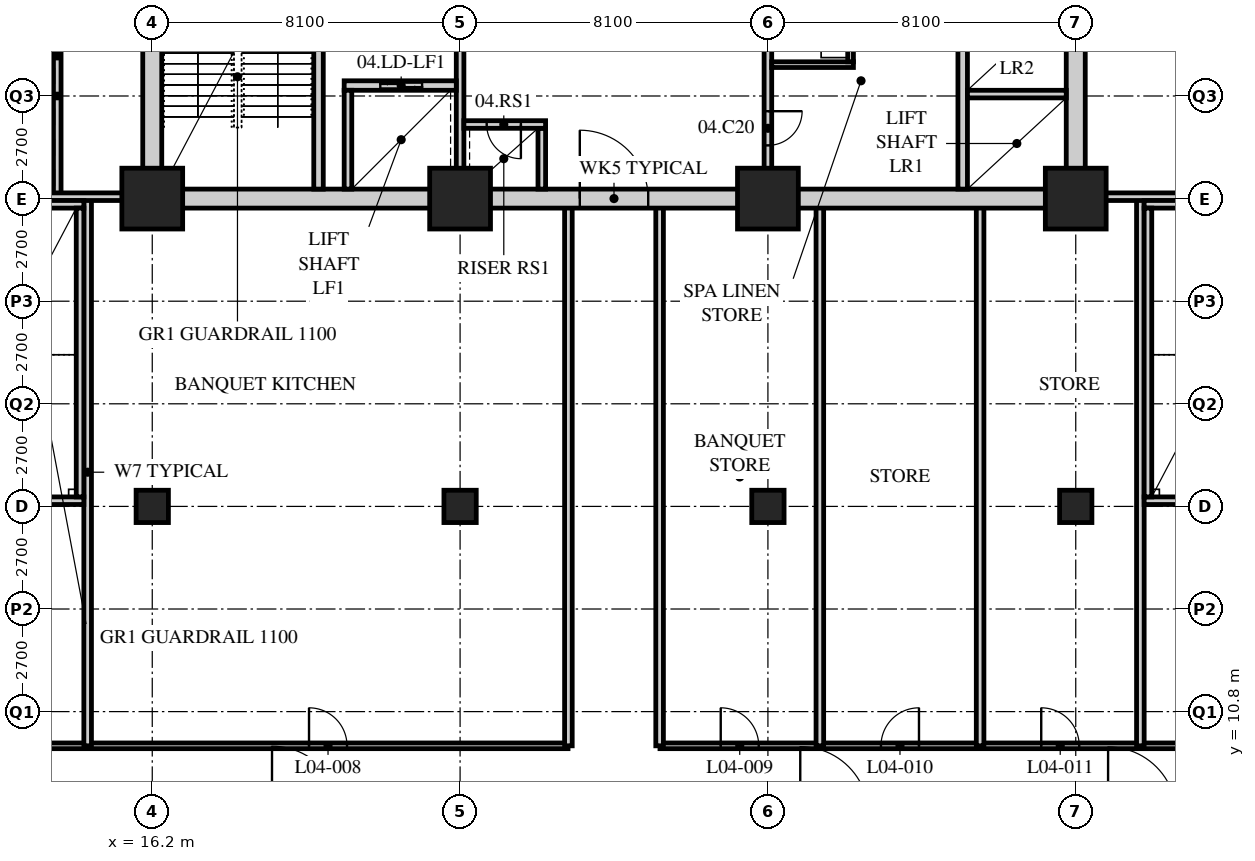
"""IFC4 building model, lengths in metres.
Left out: names, types, materials, properties, quantities, classifications, styles, units other than length and angle.
Written with IfcOpenShell. Run it as: python <this file> out.ifc"""

import sys

from ifc_helpers import new_model, si_unit, direction, frame, frame_2d, origin, origin_2d, place, context, subcontext, project, spatial, rectangle, hollow_rectangle, extrude, element, fill, save


model = new_model("IFC4")
c1 = context("Model", 3, precision=1e-05, world=origin(), true_north=direction((0.0, 1.0)))
c2 = subcontext(c1, "Body", "Model", "MODEL_VIEW")
j1 = project(units=[si_unit("LENGTHUNIT", "METRE"), si_unit("PLANEANGLEUNIT", "RADIAN")], contexts=[c1])
p1 = place(None, origin())
s1 = spatial("IfcSite", under=j1, at=p1, CompositionType="ELEMENT")
p2 = place(p1, origin())
s2 = spatial("IfcBuilding", under=s1, at=p2, CompositionType="ELEMENT")
p3 = place(p2, frame((0.0, 0.0, 22.2)))
s3 = spatial("IfcBuildingStorey", under=s2, at=p3, CompositionType="ELEMENT", Elevation=22.2)
p4 = place(p3, frame((16.2, 16.2, 0.0), z_axis=(0.0, 0.0, 1.0), x_axis=(1.0, 0.0, 0.0)))
e1 = element("IfcColumn", 1, at=p4, inside=s3, PredefinedType="COLUMN", context=c2, shape_type="SweptSolid", body=[
    extrude(hollow_rectangle(XDim=0.85, YDim=0.85, WallThickness=0.085, at=origin_2d()), origin(), (0.0, 0.0, 1.0), 5.4),
])
p5 = place(p3, frame((16.2, 24.3, 0.0), z_axis=(0.0, 0.0, 1.0), x_axis=(1.0, 0.0, 0.0)))
e2 = element("IfcColumn", 2, at=p5, inside=s3, PredefinedType="COLUMN", context=c2, shape_type="SweptSolid", body=[
    extrude(hollow_rectangle(XDim=1.6, YDim=1.6, WallThickness=0.15, at=origin_2d()), origin(), (0.0, 0.0, 1.0), 5.4),
])
p6 = place(p3, frame((24.3, 16.2, 0.0), z_axis=(0.0, 0.0, 1.0), x_axis=(1.0, 0.0, 0.0)))
e3 = element("IfcColumn", 3, at=p6, inside=s3, PredefinedType="COLUMN", context=c2, shape_type="SweptSolid", body=[
    extrude(hollow_rectangle(XDim=0.85, YDim=0.85, WallThickness=0.085, at=origin_2d()), origin(), (0.0, 0.0, 1.0), 5.4),
])
p7 = place(p3, frame((24.3, 24.3, 0.0), z_axis=(0.0, 0.0, 1.0), x_axis=(1.0, 0.0, 0.0)))
e4 = element("IfcColumn", 4, at=p7, inside=s3, PredefinedType="COLUMN", context=c2, shape_type="SweptSolid", body=[
    extrude(hollow_rectangle(XDim=1.6, YDim=1.6, WallThickness=0.15, at=origin_2d()), origin(), (0.0, 0.0, 1.0), 5.4),
])
p8 = place(p3, frame((32.4, 16.2, 0.0), z_axis=(0.0, 0.0, 1.0), x_axis=(1.0, 0.0, 0.0)))
e5 = element("IfcColumn", 5, at=p8, inside=s3, PredefinedType="COLUMN", context=c2, shape_type="SweptSolid", body=[
    extrude(hollow_rectangle(XDim=0.85, YDim=0.85, WallThickness=0.085, at=origin_2d()), origin(), (0.0, 0.0, 1.0), 5.4),
])
p9 = place(p3, frame((32.4, 24.3, 0.0), z_axis=(0.0, 0.0, 1.0), x_axis=(1.0, 0.0, 0.0)))
e6 = element("IfcColumn", 6, at=p9, inside=s3, PredefinedType="COLUMN", context=c2, shape_type="SweptSolid", body=[
    extrude(hollow_rectangle(XDim=1.6, YDim=1.6, WallThickness=0.15, at=origin_2d()), origin(), (0.0, 0.0, 1.0), 5.4),
])
p10 = place(p3, frame((40.5, 16.2, 0.0), z_axis=(0.0, 0.0, 1.0), x_axis=(1.0, 0.0, 0.0)))
e7 = element("IfcColumn", 7, at=p10, inside=s3, PredefinedType="COLUMN", context=c2, shape_type="SweptSolid", body=[
    extrude(hollow_rectangle(XDim=0.85, YDim=0.85, WallThickness=0.085, at=origin_2d()), origin(), (0.0, 0.0, 1.0), 5.4),
])
p11 = place(p3, frame((40.5, 24.3, 0.0), z_axis=(0.0, 0.0, 1.0), x_axis=(1.0, 0.0, 0.0)))
e8 = element("IfcColumn", 8, at=p11, inside=s3, PredefinedType="COLUMN", context=c2, shape_type="SweptSolid", body=[
    extrude(hollow_rectangle(XDim=1.6, YDim=1.6, WallThickness=0.15, at=origin_2d()), origin(), (0.0, 0.0, 1.0), 5.4),
])
p12 = place(p3, frame((9.9, 9.9, 0.0), z_axis=(0.0, 0.0, 1.0), x_axis=(1.0, 0.0, 0.0)))
e9 = element("IfcWall", 9, at=p12, inside=s3, PredefinedType="PARTITIONING", context=c2, shape_type="SweptSolid", body=[
    extrude(rectangle(XDim=17.24, YDim=0.15, at=frame_2d((8.62, 0.0))), origin(), (0.0, 0.0, 1.0), 5.19),
])
p13 = place(p12, frame((10.425, 0.0, 0.0)))
e10 = element("IfcOpeningElement", 10, at=p13, cuts=e9, PredefinedType="OPENING", context=c2, shape_type="SweptSolid", body=[
    extrude(rectangle(XDim=1.0, YDim=2.1, at=frame_2d((0.5, 1.05))), frame((0.0, 0.085, 0.0), z_axis=(0.0, -1.0, 0.0), x_axis=(1.0, 0.0, 0.0)), (0.0, 0.0, 1.0), 0.17),
])
p14 = place(p3, frame((29.56, 9.9, 0.0), z_axis=(0.0, 0.0, 1.0), x_axis=(1.0, 0.0, 0.0)))
e11 = element("IfcWall", 11, at=p14, inside=s3, PredefinedType="PARTITIONING", context=c2, shape_type="SweptSolid", body=[
    extrude(rectangle(XDim=17.24, YDim=0.15, at=frame_2d((8.62, 0.0))), origin(), (0.0, 0.0, 1.0), 5.19),
])
p15 = place(p14, frame((1.598, 0.0, 0.0)))
e12 = element("IfcOpeningElement", 12, at=p15, cuts=e11, PredefinedType="OPENING", context=c2, shape_type="SweptSolid", body=[
    extrude(rectangle(XDim=1.0, YDim=2.1, at=frame_2d((0.5, 1.05))), frame((0.0, 0.085, 0.0), z_axis=(0.0, -1.0, 0.0), x_axis=(1.0, 0.0, 0.0)), (0.0, 0.0, 1.0), 0.17),
])
p16 = place(p14, frame((5.815, 0.0, 0.0)))
e13 = element("IfcOpeningElement", 13, at=p16, cuts=e11, PredefinedType="OPENING", context=c2, shape_type="SweptSolid", body=[
    extrude(rectangle(XDim=1.0, YDim=2.1, at=frame_2d((0.5, 1.05))), frame((0.0, 0.085, 0.0), z_axis=(0.0, -1.0, 0.0), x_axis=(1.0, 0.0, 0.0)), (0.0, 0.0, 1.0), 0.17),
])
p17 = place(p14, frame((10.032, 0.0, 0.0)))
e14 = element("IfcOpeningElement", 14, at=p17, cuts=e11, PredefinedType="OPENING", context=c2, shape_type="SweptSolid", body=[
    extrude(rectangle(XDim=1.0, YDim=2.1, at=frame_2d((0.5, 1.05))), frame((0.0, 0.085, 0.0), z_axis=(0.0, -1.0, 0.0), x_axis=(1.0, 0.0, 0.0)), (0.0, 0.0, 1.0), 0.17),
])
p18 = place(p3, frame((13.7, 24.3, 0.0), z_axis=(0.0, 0.0, 1.0), x_axis=(0.0, 1.0, 0.0)))
e15 = element("IfcWall", 15, at=p18, inside=s3, PredefinedType="SOLIDWALL", context=c2, shape_type="SweptSolid", body=[
    extrude(rectangle(XDim=4.8, YDim=0.2, at=frame_2d((2.4, 0.0))), origin(), (0.0, 0.0, 1.0), 5.19),
])
for number, where, z_axis, x_axis in (
    (16, (14.5, 9.9, 0.0), (0.0, 0.0, 1.0), (0.0, 1.0, 0.0)),
    (17, (33.767, 9.9, 0.0), (0.0, 0.0, 1.0), (0.0, 1.0, 0.0)),
    (18, (37.983, 9.9, 0.0), (0.0, 0.0, 1.0), (0.0, 1.0, 0.0)),
    (19, (42.2, 9.9, 0.0), (0.0, 0.0, 1.0), (0.0, 1.0, 0.0)),
    (20, (27.15, 9.9, 0.0), (0.0, 0.0, 1.0), (0.0, 1.0, 0.0)),
    (21, (29.55, 9.9, 0.0), (0.0, 0.0, 1.0), (0.0, 1.0, 0.0)),
):
    element("IfcWall", number, at=place(p3, frame(where, z_axis=z_axis, x_axis=x_axis)), inside=s3, PredefinedType="SOLIDWALL", context=c2, shape_type="SweptSolid", body=[
        extrude(rectangle(XDim=14.4, YDim=0.2, at=frame_2d((7.2, 0.0))), origin(), (0.0, 0.0, 1.0), 5.19),
    ])
for number, where, z_axis, x_axis in (
    (22, (9.9, 24.35, 0.0), (0.0, 0.0, 1.0), (1.0, 0.0, 0.0)),
    (23, (40.5, 24.35, 0.0), (0.0, 0.0, 1.0), (1.0, 0.0, 0.0)),
):
    element("IfcWall", number, at=place(p3, frame(where, z_axis=z_axis, x_axis=x_axis)), inside=s3, PredefinedType="SOLIDWALL", context=c2, shape_type="SweptSolid", body=[
        extrude(rectangle(XDim=6.3, YDim=0.2, at=frame_2d((3.15, 0.0))), origin(), (0.0, 0.0, 1.0), 4.428),
    ])
for number, where, z_axis, x_axis in (
    (24, (12.0, 27.0, 0.0), (0.0, 0.0, 1.0), (1.0, 0.0, 0.0)),
    (25, (12.0, 28.05, 0.0), (0.0, 0.0, 1.0), (1.0, 0.0, 0.0)),
):
    element("IfcWall", number, at=place(p3, frame(where, z_axis=z_axis, x_axis=x_axis)), inside=s3, PredefinedType="PARTITIONING", context=c2, shape_type="SweptSolid", body=[
        extrude(rectangle(XDim=1.7, YDim=0.1, at=frame_2d((0.85, 0.0))), origin(), (0.0, 0.0, 1.0), 5.19),
    ])
p19 = place(p3, frame((15.95, 24.3, 0.0), z_axis=(0.0, 0.0, 1.0), x_axis=(1.0, 0.0, 0.0)))
e26 = element("IfcWall", 26, at=p19, inside=s3, PredefinedType="SOLIDWALL", context=c2, shape_type="SweptSolid", body=[
    extrude(rectangle(XDim=24.8, YDim=0.5, at=frame_2d((12.4, 0.0))), origin(), (0.0, 0.0, 1.0), 4.428),
])
p20 = place(p19, frame((11.5, 0.0, 0.0)))
e27 = element("IfcOpeningElement", 27, at=p20, cuts=e26, PredefinedType="OPENING", context=c2, shape_type="SweptSolid", body=[
    extrude(rectangle(XDim=1.8, YDim=2.4, at=frame_2d((0.9, 1.2))), frame((0.0, 0.26, 0.0), z_axis=(0.0, -1.0, 0.0), x_axis=(1.0, 0.0, 0.0)), (0.0, 0.0, 1.0), 0.52),
])
for number, where, z_axis, x_axis in (
    (28, (16.2, 24.55, 0.0), (0.0, 0.0, 1.0), (0.0, 1.0, 0.0)),
    (29, (40.5, 24.55, 0.0), (0.0, 0.0, 1.0), (0.0, 1.0, 0.0)),
):
    element("IfcWall", number, at=place(p3, frame(where, z_axis=z_axis, x_axis=x_axis)), inside=s3, PredefinedType="SOLIDWALL", context=c2, shape_type="SweptSolid", body=[
        extrude(rectangle(XDim=15.7, YDim=0.5, at=frame_2d((7.85, 0.0))), origin(), (0.0, 0.0, 1.0), 4.428),
    ])
p21 = place(p3, frame((24.3, 24.55, 0.0), z_axis=(0.0, 0.0, 1.0), x_axis=(0.0, 1.0, 0.0)))
e30 = element("IfcWall", 30, at=p21, inside=s3, PredefinedType="SOLIDWALL", context=c2, shape_type="SweptSolid", body=[
    extrude(rectangle(XDim=7.75, YDim=0.2, at=frame_2d((3.875, 0.0))), origin(), (0.0, 0.0, 1.0), 4.428),
])
p22 = place(p21, frame((4.6, 0.0, 0.0)))
e31 = element("IfcOpeningElement", 31, at=p22, cuts=e30, PredefinedType="OPENING", context=c2, shape_type="SweptSolid", body=[
    extrude(rectangle(XDim=1.2, YDim=2.1, at=frame_2d((0.6, 1.05))), frame((0.0, 0.11, 0.0), z_axis=(0.0, -1.0, 0.0), x_axis=(1.0, 0.0, 0.0)), (0.0, 0.0, 1.0), 0.22),
])
p23 = place(p3, frame((20.575, 24.55, 0.0), z_axis=(0.0, 0.0, 1.0), x_axis=(0.0, 1.0, 0.0)))
e32 = element("IfcWall", 32, at=p23, inside=s3, PredefinedType="SOLIDWALL", context=c2, shape_type="SweptSolid", body=[
    extrude(rectangle(XDim=7.75, YDim=0.25, at=frame_2d((3.875, 0.0))), origin(), (0.0, 0.0, 1.0), 5.19),
])
p24 = place(p23, frame((6.2, 0.0, 0.0)))
e33 = element("IfcOpeningElement", 33, at=p24, cuts=e32, PredefinedType="OPENING", context=c2, shape_type="SweptSolid", body=[
    extrude(rectangle(XDim=1.2, YDim=2.1, at=frame_2d((0.6, 1.05))), frame((0.0, 0.135, 0.0), z_axis=(0.0, -1.0, 0.0), x_axis=(1.0, 0.0, 0.0)), (0.0, 0.0, 1.0), 0.27),
])
p25 = place(p3, frame((21.25, 27.275, 0.0), z_axis=(0.0, 0.0, 1.0), x_axis=(1.0, 0.0, 0.0)))
e34 = element("IfcWall", 34, at=p25, inside=s3, PredefinedType="SOLIDWALL", context=c2, shape_type="SweptSolid", body=[
    extrude(rectangle(XDim=2.95, YDim=0.25, at=frame_2d((1.475, 0.0))), origin(), (0.0, 0.0, 1.0), 5.19),
])
p26 = place(p25, frame((0.95, 0.0, 0.0)))
e35 = element("IfcOpeningElement", 35, at=p26, cuts=e34, PredefinedType="OPENING", context=c2, shape_type="SweptSolid", body=[
    extrude(rectangle(XDim=1.1, YDim=2.4, at=frame_2d((0.55, 1.2))), frame((0.0, 0.135, 0.0), z_axis=(0.0, -1.0, 0.0), x_axis=(1.0, 0.0, 0.0)), (0.0, 0.0, 1.0), 0.27),
])
p27 = place(p3, frame((21.35, 24.55, 0.0), z_axis=(0.0, 0.0, 1.0), x_axis=(0.0, 1.0, 0.0)))
e36 = element("IfcWall", 36, at=p27, inside=s3, PredefinedType="SOLIDWALL", context=c2, shape_type="SweptSolid", body=[
    extrude(rectangle(XDim=2.6, YDim=0.2, at=frame_2d((1.3, 0.0))), origin(), (0.0, 0.0, 1.0), 5.19),
])
p28 = place(p3, frame((26.45, 24.55, 0.0), z_axis=(0.0, 0.0, 1.0), x_axis=(0.0, 1.0, 0.0)))
e37 = element("IfcWall", 37, at=p28, inside=s3, PredefinedType="SOLIDWALL", context=c2, shape_type="SweptSolid", body=[
    extrude(rectangle(XDim=1.6, YDim=0.2, at=frame_2d((0.8, 0.0))), origin(), (0.0, 0.0, 1.0), 5.19),
])
p29 = place(p3, frame((24.4, 26.25, 0.0), z_axis=(0.0, 0.0, 1.0), x_axis=(1.0, 0.0, 0.0)))
e38 = element("IfcWall", 38, at=p29, inside=s3, PredefinedType="SOLIDWALL", context=c2, shape_type="SweptSolid", body=[
    extrude(rectangle(XDim=2.15, YDim=0.2, at=frame_2d((1.075, 0.0))), origin(), (0.0, 0.0, 1.0), 5.19),
])
p30 = place(p29, frame((0.6, 0.0, 0.0)))
e39 = element("IfcOpeningElement", 39, at=p30, cuts=e38, PredefinedType="OPENING", context=c2, shape_type="SweptSolid", body=[
    extrude(rectangle(XDim=0.9, YDim=2.1, at=frame_2d((0.45, 1.05))), frame((0.0, 0.11, 0.0), z_axis=(0.0, -1.0, 0.0), x_axis=(1.0, 0.0, 0.0)), (0.0, 0.0, 1.0), 0.22),
])
p31 = place(p3, frame((37.525, 24.55, 0.0), z_axis=(0.0, 0.0, 1.0), x_axis=(0.0, 1.0, 0.0)))
e40 = element("IfcWall", 40, at=p31, inside=s3, PredefinedType="SOLIDWALL", context=c2, shape_type="SweptSolid", body=[
    extrude(rectangle(XDim=7.75, YDim=0.25, at=frame_2d((3.875, 0.0))), origin(), (0.0, 0.0, 1.0), 5.19),
])
p32 = place(p3, frame((37.65, 27.05, 0.0), z_axis=(0.0, 0.0, 1.0), x_axis=(1.0, 0.0, 0.0)))
e41 = element("IfcWall", 41, at=p32, inside=s3, PredefinedType="SOLIDWALL", context=c2, shape_type="SweptSolid", body=[
    extrude(rectangle(XDim=2.6, YDim=0.2, at=frame_2d((1.3, 0.0))), origin(), (0.0, 0.0, 1.0), 5.19),
])
p33 = place(p3, frame((32.4, 24.55, 0.0), z_axis=(0.0, 0.0, 1.0), x_axis=(0.0, 1.0, 0.0)))
e42 = element("IfcWall", 42, at=p33, inside=s3, PredefinedType="PARTITIONING", context=c2, shape_type="SweptSolid", body=[
    extrude(rectangle(XDim=7.75, YDim=0.2, at=frame_2d((3.875, 0.0))), origin(), (0.0, 0.0, 1.0), 4.428),
])
p34 = place(p33, frame((1.15, 0.0, 0.0)))
e43 = element("IfcOpeningElement", 43, at=p34, cuts=e42, PredefinedType="OPENING", context=c2, shape_type="SweptSolid", body=[
    extrude(rectangle(XDim=0.9, YDim=2.1, at=frame_2d((0.45, 1.05))), frame((0.0, 0.11, 0.0), z_axis=(0.0, -1.0, 0.0), x_axis=(1.0, 0.0, 0.0)), (0.0, 0.0, 1.0), 0.22),
])
p35 = place(p33, frame((3.85, 0.0, 0.0)))
e44 = element("IfcOpeningElement", 44, at=p35, cuts=e42, PredefinedType="OPENING", context=c2, shape_type="SweptSolid", body=[
    extrude(rectangle(XDim=1.0, YDim=2.1, at=frame_2d((0.5, 1.05))), frame((0.0, 0.11, 0.0), z_axis=(0.0, -1.0, 0.0), x_axis=(1.0, 0.0, 0.0)), (0.0, 0.0, 1.0), 0.22),
])
p36 = place(p33, frame((6.1, 0.0, 0.0)))
e45 = element("IfcOpeningElement", 45, at=p36, cuts=e42, PredefinedType="OPENING", context=c2, shape_type="SweptSolid", body=[
    extrude(rectangle(XDim=0.9, YDim=2.1, at=frame_2d((0.45, 1.05))), frame((0.0, 0.11, 0.0), z_axis=(0.0, -1.0, 0.0), x_axis=(1.0, 0.0, 0.0)), (0.0, 0.0, 1.0), 0.22),
])
p37 = place(p3, frame((32.5, 27.825, 0.0), z_axis=(0.0, 0.0, 1.0), x_axis=(1.0, 0.0, 0.0)))
e46 = element("IfcWall", 46, at=p37, inside=s3, PredefinedType="PARTITIONING", context=c2, shape_type="SweptSolid", body=[
    extrude(rectangle(XDim=2.15, YDim=0.15, at=frame_2d((1.075, 0.0))), origin(), (0.0, 0.0, 1.0), 5.19),
])
p38 = place(p3, frame((34.575, 27.9, 0.0), z_axis=(0.0, 0.0, 1.0), x_axis=(0.0, 1.0, 0.0)))
e47 = element("IfcWall", 47, at=p38, inside=s3, PredefinedType="PARTITIONING", context=c2, shape_type="SweptSolid", body=[
    extrude(rectangle(XDim=2.0, YDim=0.15, at=frame_2d((1.0, 0.0))), origin(), (0.0, 0.0, 1.0), 5.19),
])
p39 = place(p3, frame((10.0, 16.35, 0.0), z_axis=(0.0, 0.0, 1.0), x_axis=(1.0, 0.0, 0.0)))
e48 = element("IfcWall", 48, at=p39, inside=s3, PredefinedType="SOLIDWALL", context=c2, shape_type="SweptSolid", body=[
    extrude(rectangle(XDim=4.4, YDim=0.2, at=frame_2d((2.2, 0.0))), origin(), (0.0, 0.0, 1.0), 4.428),
])
p40 = place(p39, frame((1.6, 0.0, 0.0)))
e49 = element("IfcOpeningElement", 49, at=p40, cuts=e48, PredefinedType="OPENING", context=c2, shape_type="SweptSolid", body=[
    extrude(rectangle(XDim=1.2, YDim=2.1, at=frame_2d((0.6, 1.05))), frame((0.0, 0.11, 0.0), z_axis=(0.0, -1.0, 0.0), x_axis=(1.0, 0.0, 0.0)), (0.0, 0.0, 1.0), 0.22),
])
p41 = place(p3, frame((10.0, 24.15, 0.0), z_axis=(0.0, 0.0, 1.0), x_axis=(1.0, 0.0, 0.0)))
e50 = element("IfcWall", 50, at=p41, inside=s3, PredefinedType="SOLIDWALL", context=c2, shape_type="SweptSolid", body=[
    extrude(rectangle(XDim=4.4, YDim=0.2, at=frame_2d((2.2, 0.0))), origin(), (0.0, 0.0, 1.0), 4.428),
])
p42 = place(p3, frame((14.3, 16.45, 0.0), z_axis=(0.0, 0.0, 1.0), x_axis=(0.0, 1.0, 0.0)))
e51 = element("IfcWall", 51, at=p42, inside=s3, PredefinedType="SOLIDWALL", context=c2, shape_type="SweptSolid", body=[
    extrude(rectangle(XDim=7.6, YDim=0.2, at=frame_2d((3.8, 0.0))), origin(), (0.0, 0.0, 1.0), 5.19),
])
p43 = place(p3, frame((42.3, 16.35, 0.0), z_axis=(0.0, 0.0, 1.0), x_axis=(1.0, 0.0, 0.0)))
e52 = element("IfcWall", 52, at=p43, inside=s3, PredefinedType="SOLIDWALL", context=c2, shape_type="SweptSolid", body=[
    extrude(rectangle(XDim=4.4, YDim=0.2, at=frame_2d((2.2, 0.0))), origin(), (0.0, 0.0, 1.0), 4.428),
])
p44 = place(p43, frame((1.6, 0.0, 0.0)))
e53 = element("IfcOpeningElement", 53, at=p44, cuts=e52, PredefinedType="OPENING", context=c2, shape_type="SweptSolid", body=[
    extrude(rectangle(XDim=1.2, YDim=2.1, at=frame_2d((0.6, 1.05))), frame((0.0, 0.11, 0.0), z_axis=(0.0, -1.0, 0.0), x_axis=(1.0, 0.0, 0.0)), (0.0, 0.0, 1.0), 0.22),
])
p45 = place(p3, frame((42.3, 24.15, 0.0), z_axis=(0.0, 0.0, 1.0), x_axis=(1.0, 0.0, 0.0)))
e54 = element("IfcWall", 54, at=p45, inside=s3, PredefinedType="SOLIDWALL", context=c2, shape_type="SweptSolid", body=[
    extrude(rectangle(XDim=4.4, YDim=0.2, at=frame_2d((2.2, 0.0))), origin(), (0.0, 0.0, 1.0), 4.428),
])
p46 = place(p3, frame((42.4, 16.45, 0.0), z_axis=(0.0, 0.0, 1.0), x_axis=(0.0, 1.0, 0.0)))
e55 = element("IfcWall", 55, at=p46, inside=s3, PredefinedType="SOLIDWALL", context=c2, shape_type="SweptSolid", body=[
    extrude(rectangle(XDim=7.6, YDim=0.2, at=frame_2d((3.8, 0.0))), origin(), (0.0, 0.0, 1.0), 5.19),
])
p47 = place(p13, origin())
e56 = element("IfcDoor", 56, at=p47, inside=s3, OperationType="SINGLE_SWING_LEFT", PredefinedType="DOOR", context=c2, shape_type="SweptSolid", body=[
    extrude(rectangle(XDim=1.0, YDim=2.1, at=frame_2d((0.5, 1.05))), frame((0.0, 0.025, 0.0), z_axis=(0.0, -1.0, 0.0), x_axis=(1.0, 0.0, 0.0)), (0.0, 0.0, 1.0), 0.05),
])
fill(e10, e56)
p48 = place(p15, origin())
e57 = element("IfcDoor", 57, at=p48, inside=s3, OperationType="SINGLE_SWING_LEFT", PredefinedType="DOOR", context=c2, shape_type="SweptSolid", body=[
    extrude(rectangle(XDim=1.0, YDim=2.1, at=frame_2d((0.5, 1.05))), frame((0.0, 0.025, 0.0), z_axis=(0.0, -1.0, 0.0), x_axis=(1.0, 0.0, 0.0)), (0.0, 0.0, 1.0), 0.05),
])
fill(e12, e57)
p49 = place(p16, origin())
e58 = element("IfcDoor", 58, at=p49, inside=s3, OperationType="SINGLE_SWING_RIGHT", PredefinedType="DOOR", context=c2, shape_type="SweptSolid", body=[
    extrude(rectangle(XDim=1.0, YDim=2.1, at=frame_2d((0.5, 1.05))), frame((0.0, 0.025, 0.0), z_axis=(0.0, -1.0, 0.0), x_axis=(1.0, 0.0, 0.0)), (0.0, 0.0, 1.0), 0.05),
])
fill(e13, e58)
p50 = place(p17, origin())
e59 = element("IfcDoor", 59, at=p50, inside=s3, OperationType="SINGLE_SWING_LEFT", PredefinedType="DOOR", context=c2, shape_type="SweptSolid", body=[
    extrude(rectangle(XDim=1.0, YDim=2.1, at=frame_2d((0.5, 1.05))), frame((0.0, 0.025, 0.0), z_axis=(0.0, -1.0, 0.0), x_axis=(1.0, 0.0, 0.0)), (0.0, 0.0, 1.0), 0.05),
])
fill(e14, e59)
p51 = place(p34, origin())
e60 = element("IfcDoor", 60, at=p51, inside=s3, OperationType="SINGLE_SWING_LEFT", PredefinedType="DOOR", context=c2, shape_type="SweptSolid", body=[
    extrude(rectangle(XDim=0.9, YDim=2.1, at=frame_2d((0.45, 1.05))), frame((0.0, 0.025, 0.0), z_axis=(0.0, -1.0, 0.0), x_axis=(1.0, 0.0, 0.0)), (0.0, 0.0, 1.0), 0.05),
])
fill(e43, e60)
p52 = place(p30, origin())
e61 = element("IfcDoor", 61, at=p52, inside=s3, OperationType="SINGLE_SWING_LEFT", PredefinedType="DOOR", context=c2, shape_type="SweptSolid", body=[
    extrude(rectangle(XDim=0.9, YDim=2.1, at=frame_2d((0.45, 1.05))), frame((0.0, 0.025, 0.0), z_axis=(0.0, -1.0, 0.0), x_axis=(1.0, 0.0, 0.0)), (0.0, 0.0, 1.0), 0.05),
])
fill(e39, e61)
p53 = place(p26, origin())
e62 = element("IfcDoor", 62, at=p53, inside=s3, OperationType="DOUBLE_DOOR_SLIDING", PredefinedType="DOOR", context=c2, shape_type="SweptSolid", body=[
    extrude(rectangle(XDim=1.1, YDim=2.4, at=frame_2d((0.55, 1.2))), frame((0.0, 0.025, 0.0), z_axis=(0.0, -1.0, 0.0), x_axis=(1.0, 0.0, 0.0)), (0.0, 0.0, 1.0), 0.05),
])
fill(e35, e62)
p54 = place(p20, origin())
e63 = element("IfcDoor", 63, at=p54, inside=s3, OperationType="DOUBLE_DOOR_SINGLE_SWING", PredefinedType="DOOR", context=c2, shape_type="SweptSolid", body=[
    extrude(rectangle(XDim=1.8, YDim=2.4, at=frame_2d((0.9, 1.2))), frame((0.0, 0.025, 0.0), z_axis=(0.0, -1.0, 0.0), x_axis=(1.0, 0.0, 0.0)), (0.0, 0.0, 1.0), 0.05),
])
fill(e27, e63)
save(model, sys.argv[1])
